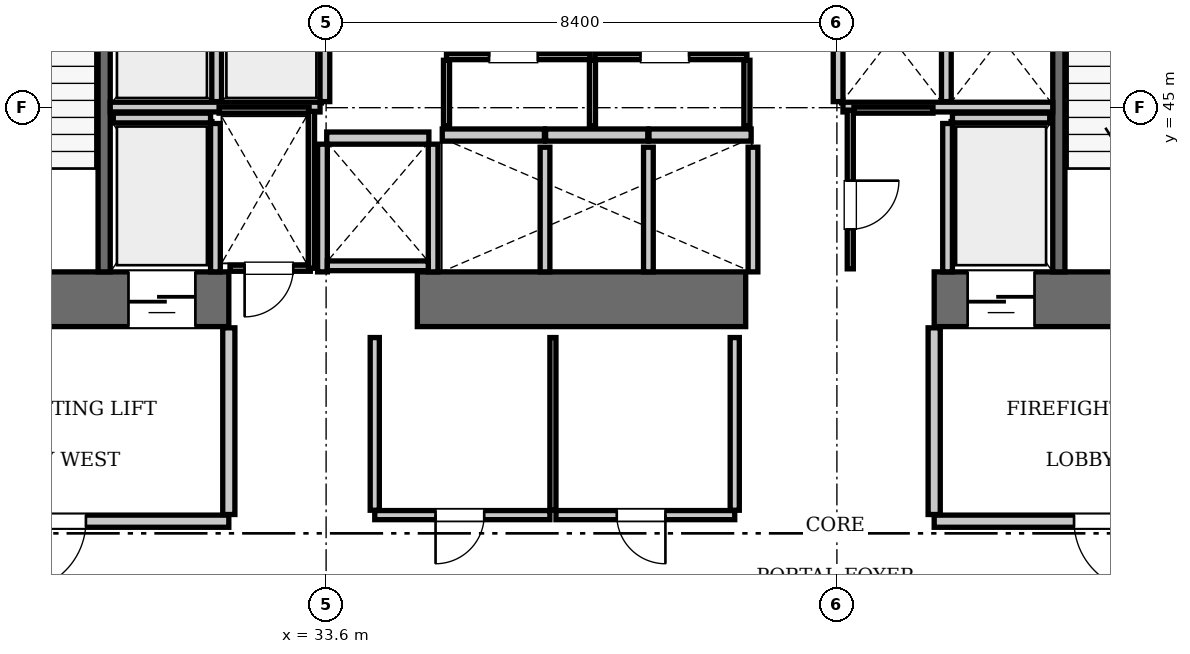
"""IFC4 building model, lengths in metres.
Left out: names, types, materials, properties, quantities, classifications, styles, units other than length and angle.
Written with IfcOpenShell. Run it as: python <this file> out.ifc"""

import sys

from ifc_helpers import new_model, si_unit, direction, frame, frame_2d, origin, place, context, subcontext, project, spatial, rectangle, extrude, element, fill, save


model = new_model("IFC4")
c1 = context("Model", 3, precision=1e-05, world=origin(), true_north=direction((0.0, 1.0)))
c2 = subcontext(c1, "Body", "Model", "MODEL_VIEW")
j1 = project(units=[si_unit("LENGTHUNIT", "METRE"), si_unit("PLANEANGLEUNIT", "RADIAN")], contexts=[c1])
p1 = place(None, origin())
s1 = spatial("IfcSite", under=j1, at=p1, CompositionType="ELEMENT")
p2 = place(p1, origin())
s2 = spatial("IfcBuilding", under=s1, at=p2, CompositionType="ELEMENT")
p3 = place(p2, frame((0.0, 0.0, 50.05)))
s3 = spatial("IfcBuildingStorey", under=s2, at=p3, CompositionType="ELEMENT", Elevation=50.05)
p4 = place(p3, frame((25.2, 41.85, 0.0), z_axis=(0.0, 0.0, 1.0), x_axis=(1.0, 0.0, 0.0)))
e1 = element("IfcWall", 1, at=p4, inside=s3, PredefinedType="SHEAR", context=c2, shape_type="SweptSolid", body=[
    extrude(rectangle(XDim=6.8, YDim=0.9, at=frame_2d((3.4, 0.0))), origin(), (0.0, 0.0, 1.0), 3.85),
])
p5 = place(p4, frame((1.65, 0.0, 0.0)))
e2 = element("IfcOpeningElement", 2, at=p5, cuts=e1, PredefinedType="OPENING", context=c2, shape_type="SweptSolid", body=[
    extrude(rectangle(XDim=1.15, YDim=2.15, at=frame_2d((0.575, 1.075))), frame((0.0, 0.46, 0.0), z_axis=(0.0, -1.0, 0.0), x_axis=(1.0, 0.0, 0.0)), (0.0, 0.0, 1.0), 0.92),
])
p6 = place(p4, frame((5.15, 0.0, 0.0)))
e3 = element("IfcOpeningElement", 3, at=p6, cuts=e1, PredefinedType="OPENING", context=c2, shape_type="SweptSolid", body=[
    extrude(rectangle(XDim=1.1, YDim=2.2, at=frame_2d((0.55, 1.1))), frame((0.0, 0.46, 0.0), z_axis=(0.0, -1.0, 0.0), x_axis=(1.0, 0.0, 0.0)), (0.0, 0.0, 1.0), 0.92),
])
p7 = place(p3, frame((35.1, 41.85, 0.0), z_axis=(0.0, 0.0, 1.0), x_axis=(1.0, 0.0, 0.0)))
e4 = element("IfcWall", 4, at=p7, inside=s3, PredefinedType="SHEAR", context=c2, shape_type="SweptSolid", body=[
    extrude(rectangle(XDim=5.4, YDim=0.9, at=frame_2d((2.7, 0.0))), origin(), (0.0, 0.0, 1.0), 3.85),
])
p8 = place(p3, frame((43.6, 41.85, 0.0), z_axis=(0.0, 0.0, 1.0), x_axis=(1.0, 0.0, 0.0)))
e5 = element("IfcWall", 5, at=p8, inside=s3, PredefinedType="SHEAR", context=c2, shape_type="SweptSolid", body=[
    extrude(rectangle(XDim=6.8, YDim=0.9, at=frame_2d((3.4, 0.0))), origin(), (0.0, 0.0, 1.0), 3.85),
])
p9 = place(p8, frame((3.9, 0.0, 0.0)))
e6 = element("IfcOpeningElement", 6, at=p9, cuts=e5, PredefinedType="OPENING", context=c2, shape_type="SweptSolid", body=[
    extrude(rectangle(XDim=1.15, YDim=2.15, at=frame_2d((0.575, 1.075))), frame((0.0, 0.46, 0.0), z_axis=(0.0, -1.0, 0.0), x_axis=(1.0, 0.0, 0.0)), (0.0, 0.0, 1.0), 0.92),
])
p10 = place(p8, frame((0.55, 0.0, 0.0)))
e7 = element("IfcOpeningElement", 7, at=p10, cuts=e5, PredefinedType="OPENING", context=c2, shape_type="SweptSolid", body=[
    extrude(rectangle(XDim=1.1, YDim=2.2, at=frame_2d((0.55, 1.1))), frame((0.0, 0.46, 0.0), z_axis=(0.0, -1.0, 0.0), x_axis=(1.0, 0.0, 0.0)), (0.0, 0.0, 1.0), 0.92),
])
for number, where, z_axis, x_axis in (
    (8, (29.95, 42.3, 0.0), (0.0, 0.0, 1.0), (0.0, 1.0, 0.0)),
    (9, (45.65, 42.3, 0.0), (0.0, 0.0, 1.0), (0.0, 1.0, 0.0)),
):
    element("IfcWall", number, at=place(p3, frame(where, z_axis=z_axis, x_axis=x_axis)), inside=s3, PredefinedType="SOLIDWALL", context=c2, shape_type="SweptSolid", body=[
        extrude(rectangle(XDim=8.85, YDim=0.2, at=frame_2d((4.425, 0.0))), origin(), (0.0, 0.0, 1.0), 3.61),
    ])
for number, where, z_axis, x_axis in (
    (10, (35.51, 44.55, 0.0), (0.0, 0.0, 1.0), (1.0, 0.0, 0.0)),
    (11, (37.21, 44.55, 0.0), (0.0, 0.0, 1.0), (1.0, 0.0, 0.0)),
):
    element("IfcWall", number, at=place(p3, frame(where, z_axis=z_axis, x_axis=x_axis)), inside=s3, PredefinedType="SOLIDWALL", context=c2, shape_type="SweptSolid", body=[
        extrude(rectangle(XDim=1.68, YDim=0.2, at=frame_2d((0.84, 0.0))), origin(), (0.0, 0.0, 1.0), 3.61),
    ])
p11 = place(p3, frame((38.91, 44.55, 0.0), z_axis=(0.0, 0.0, 1.0), x_axis=(1.0, 0.0, 0.0)))
e12 = element("IfcWall", 12, at=p11, inside=s3, PredefinedType="SOLIDWALL", context=c2, shape_type="SweptSolid", body=[
    extrude(rectangle(XDim=1.68, YDim=0.2, at=frame_2d((0.84, 0.0))), origin(), (0.0, 0.0, 1.0), 3.61),
])
p12 = place(p3, frame((33.61, 44.5, 0.0), z_axis=(0.0, 0.0, 1.0), x_axis=(1.0, 0.0, 0.0)))
e13 = element("IfcWall", 13, at=p12, inside=s3, PredefinedType="SOLIDWALL", context=c2, shape_type="SweptSolid", body=[
    extrude(rectangle(XDim=1.68, YDim=0.2, at=frame_2d((0.84, 0.0))), origin(), (0.0, 0.0, 1.0), 3.61),
])
p13 = place(p3, frame((30.1, 44.83, 0.0), z_axis=(0.0, 0.0, 1.0), x_axis=(1.0, 0.0, 0.0)))
e14 = element("IfcWall", 14, at=p13, inside=s3, PredefinedType="SOLIDWALL", context=c2, shape_type="SweptSolid", body=[
    extrude(rectangle(XDim=1.6, YDim=0.16, at=frame_2d((0.8, 0.0))), origin(), (0.0, 0.0, 1.0), 3.61),
])
p14 = place(p3, frame((31.78, 42.3, 0.0), z_axis=(0.0, 0.0, 1.0), x_axis=(0.0, 1.0, 0.0)))
e15 = element("IfcWall", 15, at=p14, inside=s3, PredefinedType="SOLIDWALL", context=c2, shape_type="SweptSolid", body=[
    extrude(rectangle(XDim=2.44, YDim=0.16, at=frame_2d((1.22, 0.0))), origin(), (0.0, 0.0, 1.0), 3.61),
])
p15 = place(p3, frame((43.9, 44.83, 0.0), z_axis=(0.0, 0.0, 1.0), x_axis=(1.0, 0.0, 0.0)))
e16 = element("IfcWall", 16, at=p15, inside=s3, PredefinedType="SOLIDWALL", context=c2, shape_type="SweptSolid", body=[
    extrude(rectangle(XDim=1.6, YDim=0.16, at=frame_2d((0.8, 0.0))), origin(), (0.0, 0.0, 1.0), 3.61),
])
p16 = place(p3, frame((43.82, 42.3, 0.0), z_axis=(0.0, 0.0, 1.0), x_axis=(0.0, 1.0, 0.0)))
e17 = element("IfcWall", 17, at=p16, inside=s3, PredefinedType="SOLIDWALL", context=c2, shape_type="SweptSolid", body=[
    extrude(rectangle(XDim=2.44, YDim=0.16, at=frame_2d((1.22, 0.0))), origin(), (0.0, 0.0, 1.0), 3.61),
])
for number, where, z_axis, x_axis in (
    (18, (31.8, 45.1, 0.0), (0.0, 0.0, 1.0), (0.0, 1.0, 0.0)),
    (19, (33.58, 45.1, 0.0), (0.0, 0.0, 1.0), (0.0, 1.0, 0.0)),
):
    element("IfcWall", number, at=place(p3, frame(where, z_axis=z_axis, x_axis=x_axis)), inside=s3, PredefinedType="SOLIDWALL", context=c2, shape_type="SweptSolid", body=[
        extrude(rectangle(XDim=1.95, YDim=0.16, at=frame_2d((0.975, 0.0))), origin(), (0.0, 0.0, 1.0), 3.61),
    ])
p17 = place(p3, frame((30.05, 45.01, 0.0), z_axis=(0.0, 0.0, 1.0), x_axis=(1.0, 0.0, 0.0)))
e20 = element("IfcWall", 20, at=p17, inside=s3, PredefinedType="SOLIDWALL", context=c2, shape_type="SweptSolid", body=[
    extrude(rectangle(XDim=3.45, YDim=0.16, at=frame_2d((1.725, 0.0))), origin(), (0.0, 0.0, 1.0), 3.61),
])
for number, where, z_axis, x_axis in (
    (21, (42.02, 45.1, 0.0), (0.0, 0.0, 1.0), (0.0, 1.0, 0.0)),
    (22, (43.8, 45.1, 0.0), (0.0, 0.0, 1.0), (0.0, 1.0, 0.0)),
):
    element("IfcWall", number, at=place(p3, frame(where, z_axis=z_axis, x_axis=x_axis)), inside=s3, PredefinedType="SOLIDWALL", context=c2, shape_type="SweptSolid", body=[
        extrude(rectangle(XDim=1.95, YDim=0.16, at=frame_2d((0.975, 0.0))), origin(), (0.0, 0.0, 1.0), 3.61),
    ])
p18 = place(p3, frame((42.1, 45.01, 0.0), z_axis=(0.0, 0.0, 1.0), x_axis=(1.0, 0.0, 0.0)))
e23 = element("IfcWall", 23, at=p18, inside=s3, PredefinedType="SOLIDWALL", context=c2, shape_type="SweptSolid", body=[
    extrude(rectangle(XDim=3.45, YDim=0.16, at=frame_2d((1.725, 0.0))), origin(), (0.0, 0.0, 1.0), 3.61),
])
for number, where, z_axis, x_axis in (
    (24, (37.2, 42.3, 0.0), (0.0, 0.0, 1.0), (0.0, 1.0, 0.0)),
    (25, (38.9, 42.3, 0.0), (0.0, 0.0, 1.0), (0.0, 1.0, 0.0)),
    (26, (40.62, 42.3, 0.0), (0.0, 0.0, 1.0), (0.0, 1.0, 0.0)),
):
    element("IfcWall", number, at=place(p3, frame(where, z_axis=z_axis, x_axis=x_axis)), inside=s3, PredefinedType="SOLIDWALL", context=c2, shape_type="SweptSolid", body=[
        extrude(rectangle(XDim=2.05, YDim=0.16, at=frame_2d((1.025, 0.0))), origin(), (0.0, 0.0, 1.0), 3.61),
    ])
for number, where, z_axis, x_axis in (
    (27, (33.54, 42.3, 0.0), (0.0, 0.0, 1.0), (0.0, 1.0, 0.0)),
    (28, (35.36, 42.3, 0.0), (0.0, 0.0, 1.0), (0.0, 1.0, 0.0)),
):
    element("IfcWall", number, at=place(p3, frame(where, z_axis=z_axis, x_axis=x_axis)), inside=s3, PredefinedType="SOLIDWALL", context=c2, shape_type="SweptSolid", body=[
        extrude(rectangle(XDim=2.1, YDim=0.16, at=frame_2d((1.05, 0.0))), origin(), (0.0, 0.0, 1.0), 3.61),
    ])
p19 = place(p3, frame((33.62, 42.4, 0.0), z_axis=(0.0, 0.0, 1.0), x_axis=(1.0, 0.0, 0.0)))
e29 = element("IfcWall", 29, at=p19, inside=s3, PredefinedType="SOLIDWALL", context=c2, shape_type="SweptSolid", body=[
    extrude(rectangle(XDim=1.66, YDim=0.16, at=frame_2d((0.83, 0.0))), origin(), (0.0, 0.0, 1.0), 3.61),
])
p20 = place(p3, frame((26.2, 38.2, 0.0), z_axis=(0.0, 0.0, 1.0), x_axis=(1.0, 0.0, 0.0)))
e30 = element("IfcWall", 30, at=p20, inside=s3, PredefinedType="PARTITIONING", context=c2, shape_type="SweptSolid", body=[
    extrude(rectangle(XDim=5.8, YDim=0.2, at=frame_2d((2.9, 0.0))), origin(), (0.0, 0.0, 1.0), 3.61),
])
p21 = place(p20, frame((2.3, 0.0, 0.0)))
e31 = element("IfcOpeningElement", 31, at=p21, cuts=e30, PredefinedType="OPENING", context=c2, shape_type="SweptSolid", body=[
    extrude(rectangle(XDim=1.15, YDim=2.15, at=frame_2d((0.575, 1.075))), frame((0.0, 0.11, 0.0), z_axis=(0.0, -1.0, 0.0), x_axis=(1.0, 0.0, 0.0)), (0.0, 0.0, 1.0), 0.22),
])
p22 = place(p3, frame((32.0, 38.31, 0.0), z_axis=(0.0, 0.0, 1.0), x_axis=(0.0, 1.0, 0.0)))
e32 = element("IfcWall", 32, at=p22, inside=s3, PredefinedType="PARTITIONING", context=c2, shape_type="SweptSolid", body=[
    extrude(rectangle(XDim=3.07, YDim=0.2, at=frame_2d((1.535, 0.0))), origin(), (0.0, 0.0, 1.0), 3.61),
])
p23 = place(p3, frame((43.6, 38.2, 0.0), z_axis=(0.0, 0.0, 1.0), x_axis=(1.0, 0.0, 0.0)))
e33 = element("IfcWall", 33, at=p23, inside=s3, PredefinedType="PARTITIONING", context=c2, shape_type="SweptSolid", body=[
    extrude(rectangle(XDim=5.8, YDim=0.2, at=frame_2d((2.9, 0.0))), origin(), (0.0, 0.0, 1.0), 3.61),
])
p24 = place(p23, frame((2.3, 0.0, 0.0)))
e34 = element("IfcOpeningElement", 34, at=p24, cuts=e33, PredefinedType="OPENING", context=c2, shape_type="SweptSolid", body=[
    extrude(rectangle(XDim=1.15, YDim=2.15, at=frame_2d((0.575, 1.075))), frame((0.0, 0.11, 0.0), z_axis=(0.0, -1.0, 0.0), x_axis=(1.0, 0.0, 0.0)), (0.0, 0.0, 1.0), 0.22),
])
p25 = place(p3, frame((43.6, 38.31, 0.0), z_axis=(0.0, 0.0, 1.0), x_axis=(0.0, 1.0, 0.0)))
e35 = element("IfcWall", 35, at=p25, inside=s3, PredefinedType="PARTITIONING", context=c2, shape_type="SweptSolid", body=[
    extrude(rectangle(XDim=3.07, YDim=0.2, at=frame_2d((1.535, 0.0))), origin(), (0.0, 0.0, 1.0), 3.61),
])
p26 = place(p3, frame((32.02, 42.36, 0.0), z_axis=(0.0, 0.0, 1.0), x_axis=(1.0, 0.0, 0.0)))
e36 = element("IfcWall", 36, at=p26, inside=s3, PredefinedType="PARTITIONING", context=c2, shape_type="SweptSolid", body=[
    extrude(rectangle(XDim=1.32, YDim=0.1, at=frame_2d((0.66, 0.0))), origin(), (0.0, 0.0, 1.0), 3.61),
])
p27 = place(p26, frame((0.24, 0.0, 0.0)))
e37 = element("IfcOpeningElement", 37, at=p27, cuts=e36, PredefinedType="OPENING", context=c2, shape_type="SweptSolid", body=[
    extrude(rectangle(XDim=0.8, YDim=2.05, at=frame_2d((0.4, 1.025))), frame((0.0, 0.06, 0.0), z_axis=(0.0, -1.0, 0.0), x_axis=(1.0, 0.0, 0.0)), (0.0, 0.0, 1.0), 0.12),
])
p28 = place(p3, frame((31.84, 44.96, 0.0), z_axis=(0.0, 0.0, 1.0), x_axis=(1.0, 0.0, 0.0)))
e38 = element("IfcWall", 38, at=p28, inside=s3, PredefinedType="PARTITIONING", context=c2, shape_type="SweptSolid", body=[
    extrude(rectangle(XDim=1.48, YDim=0.1, at=frame_2d((0.74, 0.0))), origin(), (0.0, 0.0, 1.0), 3.61),
])
p29 = place(p3, frame((33.36, 42.36, 0.0), z_axis=(0.0, 0.0, 1.0), x_axis=(0.0, 1.0, 0.0)))
e39 = element("IfcWall", 39, at=p29, inside=s3, PredefinedType="PARTITIONING", context=c2, shape_type="SweptSolid", body=[
    extrude(rectangle(XDim=2.58, YDim=0.1, at=frame_2d((1.29, 0.0))), origin(), (0.0, 0.0, 1.0), 3.61),
])
p30 = place(p3, frame((35.58, 45.84, 0.0), z_axis=(0.0, 0.0, 1.0), x_axis=(1.0, 0.0, 0.0)))
e40 = element("IfcWall", 40, at=p30, inside=s3, PredefinedType="PARTITIONING", context=c2, shape_type="SweptSolid", body=[
    extrude(rectangle(XDim=2.36, YDim=0.1, at=frame_2d((1.18, 0.0))), origin(), (0.0, 0.0, 1.0), 3.61),
])
p31 = place(p30, frame((0.7, 0.0, 0.0)))
e41 = element("IfcOpeningElement", 41, at=p31, cuts=e40, PredefinedType="OPENING", context=c2, shape_type="SweptSolid", body=[
    extrude(rectangle(XDim=0.8, YDim=2.05, at=frame_2d((0.4, 1.025))), frame((0.0, 0.06, 0.0), z_axis=(0.0, -1.0, 0.0), x_axis=(1.0, 0.0, 0.0)), (0.0, 0.0, 1.0), 0.12),
])
p32 = place(p3, frame((38.02, 45.84, 0.0), z_axis=(0.0, 0.0, 1.0), x_axis=(1.0, 0.0, 0.0)))
e42 = element("IfcWall", 42, at=p32, inside=s3, PredefinedType="PARTITIONING", context=c2, shape_type="SweptSolid", body=[
    extrude(rectangle(XDim=2.5, YDim=0.1, at=frame_2d((1.25, 0.0))), origin(), (0.0, 0.0, 1.0), 3.61),
])
p33 = place(p32, frame((0.75, 0.0, 0.0)))
e43 = element("IfcOpeningElement", 43, at=p33, cuts=e42, PredefinedType="OPENING", context=c2, shape_type="SweptSolid", body=[
    extrude(rectangle(XDim=0.8, YDim=2.05, at=frame_2d((0.4, 1.025))), frame((0.0, 0.06, 0.0), z_axis=(0.0, -1.0, 0.0), x_axis=(1.0, 0.0, 0.0)), (0.0, 0.0, 1.0), 0.12),
])
for number, where, z_axis, x_axis in (
    (44, (35.58, 44.7, 0.0), (0.0, 0.0, 1.0), (0.0, 1.0, 0.0)),
    (45, (37.98, 44.7, 0.0), (0.0, 0.0, 1.0), (0.0, 1.0, 0.0)),
    (46, (40.52, 44.7, 0.0), (0.0, 0.0, 1.0), (0.0, 1.0, 0.0)),
):
    element("IfcWall", number, at=place(p3, frame(where, z_axis=z_axis, x_axis=x_axis)), inside=s3, PredefinedType="PARTITIONING", context=c2, shape_type="SweptSolid", body=[
        extrude(rectangle(XDim=1.08, YDim=0.1, at=frame_2d((0.54, 0.0))), origin(), (0.0, 0.0, 1.0), 3.61),
    ])
p34 = place(p3, frame((42.22, 42.35, 0.0), z_axis=(0.0, 0.0, 1.0), x_axis=(0.0, 1.0, 0.0)))
e47 = element("IfcWall", 47, at=p34, inside=s3, PredefinedType="PARTITIONING", context=c2, shape_type="SweptSolid", body=[
    extrude(rectangle(XDim=2.61, YDim=0.1, at=frame_2d((1.305, 0.0))), origin(), (0.0, 0.0, 1.0), 3.61),
])
p35 = place(p34, frame((0.65, 0.0, 0.0)))
e48 = element("IfcOpeningElement", 48, at=p35, cuts=e47, PredefinedType="OPENING", context=c2, shape_type="SweptSolid", body=[
    extrude(rectangle(XDim=0.8, YDim=2.05, at=frame_2d((0.4, 1.025))), frame((0.0, 0.06, 0.0), z_axis=(0.0, -1.0, 0.0), x_axis=(1.0, 0.0, 0.0)), (0.0, 0.0, 1.0), 0.12),
])
p36 = place(p3, frame((42.28, 44.96, 0.0), z_axis=(0.0, 0.0, 1.0), x_axis=(1.0, 0.0, 0.0)))
e49 = element("IfcWall", 49, at=p36, inside=s3, PredefinedType="PARTITIONING", context=c2, shape_type="SweptSolid", body=[
    extrude(rectangle(XDim=1.3, YDim=0.1, at=frame_2d((0.65, 0.0))), origin(), (0.0, 0.0, 1.0), 3.61),
])
p37 = place(p3, frame((34.4, 38.3, 0.0), z_axis=(0.0, 0.0, 1.0), x_axis=(1.0, 0.0, 0.0)))
e50 = element("IfcWall", 50, at=p37, inside=s3, PredefinedType="PARTITIONING", context=c2, shape_type="SweptSolid", body=[
    extrude(rectangle(XDim=2.88, YDim=0.15, at=frame_2d((1.44, 0.0))), origin(), (0.0, 0.0, 1.0), 3.61),
])
p38 = place(p37, frame((1.0, 0.0, 0.0)))
e51 = element("IfcOpeningElement", 51, at=p38, cuts=e50, PredefinedType="OPENING", context=c2, shape_type="SweptSolid", body=[
    extrude(rectangle(XDim=0.8, YDim=2.05, at=frame_2d((0.4, 1.025))), frame((0.0, 0.085, 0.0), z_axis=(0.0, -1.0, 0.0), x_axis=(1.0, 0.0, 0.0)), (0.0, 0.0, 1.0), 0.17),
])
p39 = place(p3, frame((37.38, 38.3, 0.0), z_axis=(0.0, 0.0, 1.0), x_axis=(1.0, 0.0, 0.0)))
e52 = element("IfcWall", 52, at=p39, inside=s3, PredefinedType="PARTITIONING", context=c2, shape_type="SweptSolid", body=[
    extrude(rectangle(XDim=2.94, YDim=0.15, at=frame_2d((1.47, 0.0))), origin(), (0.0, 0.0, 1.0), 3.61),
])
p40 = place(p39, frame((1.0, 0.0, 0.0)))
e53 = element("IfcOpeningElement", 53, at=p40, cuts=e52, PredefinedType="OPENING", context=c2, shape_type="SweptSolid", body=[
    extrude(rectangle(XDim=0.8, YDim=2.05, at=frame_2d((0.4, 1.025))), frame((0.0, 0.085, 0.0), z_axis=(0.0, -1.0, 0.0), x_axis=(1.0, 0.0, 0.0)), (0.0, 0.0, 1.0), 0.17),
])
p41 = place(p3, frame((34.4, 38.38, 0.0), z_axis=(0.0, 0.0, 1.0), x_axis=(0.0, 1.0, 0.0)))
e54 = element("IfcWall", 54, at=p41, inside=s3, PredefinedType="PARTITIONING", context=c2, shape_type="SweptSolid", body=[
    extrude(rectangle(XDim=2.84, YDim=0.15, at=frame_2d((1.42, 0.0))), origin(), (0.0, 0.0, 1.0), 3.61),
])
p42 = place(p3, frame((37.33, 38.38, 0.0), z_axis=(0.0, 0.0, 1.0), x_axis=(0.0, 1.0, 0.0)))
e55 = element("IfcWall", 55, at=p42, inside=s3, PredefinedType="PARTITIONING", context=c2, shape_type="SweptSolid", body=[
    extrude(rectangle(XDim=2.84, YDim=0.1, at=frame_2d((1.42, 0.0))), origin(), (0.0, 0.0, 1.0), 3.61),
])
p43 = place(p3, frame((40.32, 38.38, 0.0), z_axis=(0.0, 0.0, 1.0), x_axis=(0.0, 1.0, 0.0)))
e56 = element("IfcWall", 56, at=p43, inside=s3, PredefinedType="PARTITIONING", context=c2, shape_type="SweptSolid", body=[
    extrude(rectangle(XDim=2.84, YDim=0.15, at=frame_2d((1.42, 0.0))), origin(), (0.0, 0.0, 1.0), 3.61),
])
p44 = place(p6, frame((1.1, 0.0, 0.0), z_axis=(0.0, 0.0, 1.0), x_axis=(-1.0, 0.0, 0.0)))
e57 = element("IfcDoor", 57, at=p44, inside=s3, OperationType="SLIDING_TO_LEFT", PredefinedType="DOOR", context=c2, shape_type="SweptSolid", body=[
    extrude(rectangle(XDim=1.1, YDim=2.2, at=frame_2d((0.55, 1.1))), frame((0.0, 0.025, 0.0), z_axis=(0.0, -1.0, 0.0), x_axis=(1.0, 0.0, 0.0)), (0.0, 0.0, 1.0), 0.05),
])
fill(e3, e57)
p45 = place(p10, frame((1.1, 0.0, 0.0), z_axis=(0.0, 0.0, 1.0), x_axis=(-1.0, 0.0, 0.0)))
e58 = element("IfcDoor", 58, at=p45, inside=s3, OperationType="SLIDING_TO_LEFT", PredefinedType="DOOR", context=c2, shape_type="SweptSolid", body=[
    extrude(rectangle(XDim=1.1, YDim=2.2, at=frame_2d((0.55, 1.1))), frame((0.0, 0.025, 0.0), z_axis=(0.0, -1.0, 0.0), x_axis=(1.0, 0.0, 0.0)), (0.0, 0.0, 1.0), 0.05),
])
fill(e7, e58)
p46 = place(p21, frame((1.15, 0.0, 0.0), z_axis=(0.0, 0.0, 1.0), x_axis=(-1.0, 0.0, 0.0)))
e59 = element("IfcDoor", 59, at=p46, inside=s3, OperationType="SINGLE_SWING_RIGHT", PredefinedType="DOOR", context=c2, shape_type="SweptSolid", body=[
    extrude(rectangle(XDim=1.15, YDim=2.15, at=frame_2d((0.575, 1.075))), frame((0.0, 0.025, 0.0), z_axis=(0.0, -1.0, 0.0), x_axis=(1.0, 0.0, 0.0)), (0.0, 0.0, 1.0), 0.05),
])
fill(e31, e59)
p47 = place(p24, frame((1.15, 0.0, 0.0), z_axis=(0.0, 0.0, 1.0), x_axis=(-1.0, 0.0, 0.0)))
e60 = element("IfcDoor", 60, at=p47, inside=s3, OperationType="SINGLE_SWING_LEFT", PredefinedType="DOOR", context=c2, shape_type="SweptSolid", body=[
    extrude(rectangle(XDim=1.15, YDim=2.15, at=frame_2d((0.575, 1.075))), frame((0.0, 0.025, 0.0), z_axis=(0.0, -1.0, 0.0), x_axis=(1.0, 0.0, 0.0)), (0.0, 0.0, 1.0), 0.05),
])
fill(e34, e60)
p48 = place(p27, frame((0.8, 0.0, 0.0), z_axis=(0.0, 0.0, 1.0), x_axis=(-1.0, 0.0, 0.0)))
e61 = element("IfcDoor", 61, at=p48, inside=s3, OperationType="SINGLE_SWING_RIGHT", PredefinedType="DOOR", context=c2, shape_type="SweptSolid", body=[
    extrude(rectangle(XDim=0.8, YDim=2.05, at=frame_2d((0.4, 1.025))), frame((0.0, 0.025, 0.0), z_axis=(0.0, -1.0, 0.0), x_axis=(1.0, 0.0, 0.0)), (0.0, 0.0, 1.0), 0.05),
])
fill(e37, e61)
p49 = place(p31, origin())
e62 = element("IfcDoor", 62, at=p49, inside=s3, OperationType="SINGLE_SWING_LEFT", PredefinedType="DOOR", context=c2, shape_type="SweptSolid", body=[
    extrude(rectangle(XDim=0.8, YDim=2.05, at=frame_2d((0.4, 1.025))), frame((0.0, 0.025, 0.0), z_axis=(0.0, -1.0, 0.0), x_axis=(1.0, 0.0, 0.0)), (0.0, 0.0, 1.0), 0.05),
])
fill(e41, e62)
p50 = place(p33, origin())
e63 = element("IfcDoor", 63, at=p50, inside=s3, OperationType="SINGLE_SWING_RIGHT", PredefinedType="DOOR", context=c2, shape_type="SweptSolid", body=[
    extrude(rectangle(XDim=0.8, YDim=2.05, at=frame_2d((0.4, 1.025))), frame((0.0, 0.025, 0.0), z_axis=(0.0, -1.0, 0.0), x_axis=(1.0, 0.0, 0.0)), (0.0, 0.0, 1.0), 0.05),
])
fill(e43, e63)
p51 = place(p35, frame((0.8, 0.0, 0.0), z_axis=(0.0, 0.0, 1.0), x_axis=(-1.0, 0.0, 0.0)))
e64 = element("IfcDoor", 64, at=p51, inside=s3, OperationType="SINGLE_SWING_LEFT", PredefinedType="DOOR", context=c2, shape_type="SweptSolid", body=[
    extrude(rectangle(XDim=0.8, YDim=2.05, at=frame_2d((0.4, 1.025))), frame((0.0, 0.025, 0.0), z_axis=(0.0, -1.0, 0.0), x_axis=(1.0, 0.0, 0.0)), (0.0, 0.0, 1.0), 0.05),
])
fill(e48, e64)
p52 = place(p38, frame((0.8, 0.0, 0.0), z_axis=(0.0, 0.0, 1.0), x_axis=(-1.0, 0.0, 0.0)))
e65 = element("IfcDoor", 65, at=p52, inside=s3, OperationType="SINGLE_SWING_RIGHT", PredefinedType="DOOR", context=c2, shape_type="SweptSolid", body=[
    extrude(rectangle(XDim=0.8, YDim=2.05, at=frame_2d((0.4, 1.025))), frame((0.0, 0.025, 0.0), z_axis=(0.0, -1.0, 0.0), x_axis=(1.0, 0.0, 0.0)), (0.0, 0.0, 1.0), 0.05),
])
fill(e51, e65)
p53 = place(p40, frame((0.8, 0.0, 0.0), z_axis=(0.0, 0.0, 1.0), x_axis=(-1.0, 0.0, 0.0)))
e66 = element("IfcDoor", 66, at=p53, inside=s3, OperationType="SINGLE_SWING_LEFT", PredefinedType="DOOR", context=c2, shape_type="SweptSolid", body=[
    extrude(rectangle(XDim=0.8, YDim=2.05, at=frame_2d((0.4, 1.025))), frame((0.0, 0.025, 0.0), z_axis=(0.0, -1.0, 0.0), x_axis=(1.0, 0.0, 0.0)), (0.0, 0.0, 1.0), 0.05),
])
fill(e53, e66)
save(model, sys.argv[1])
